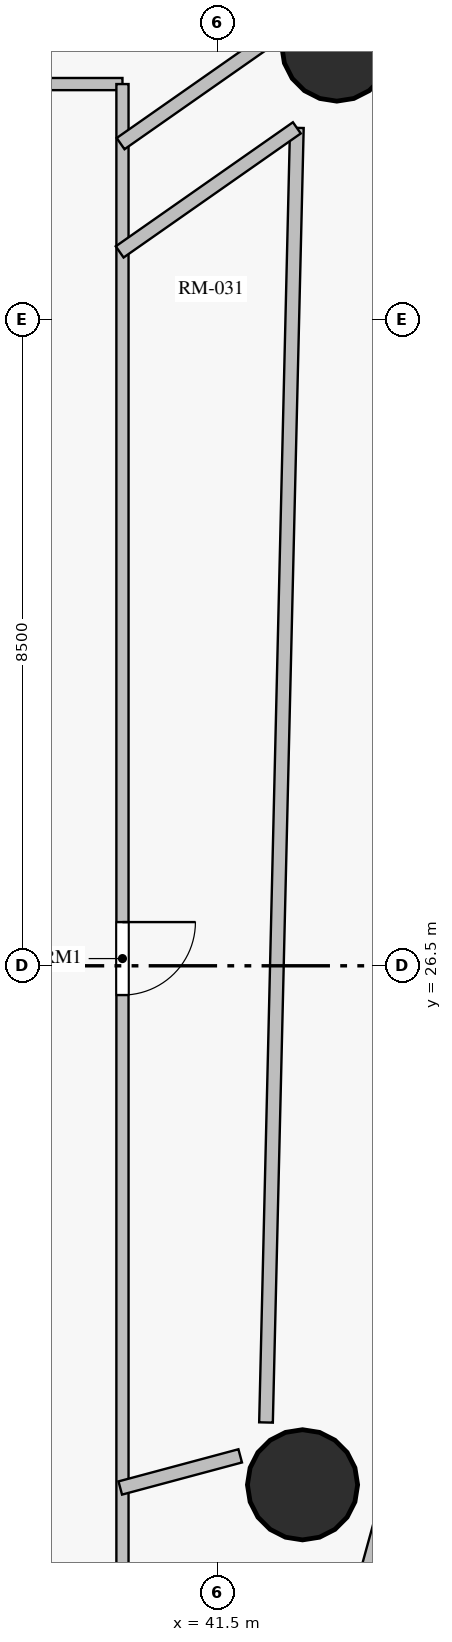
"""IFC4 building model, lengths in metres.
Left out: names, types, materials, properties, quantities, classifications, styles, units other than length and angle.
Written with IfcOpenShell. Run it as: python <this file> out.ifc"""

import sys

from ifc_helpers import new_model, si_unit, direction, frame, frame_2d, origin, origin_with_axes, origin_2d, place, context, subcontext, project, spatial, rectangle, circle, extrude, source, transform, mapped, element, fill, save


model = new_model("IFC4")
c1 = context("Model", 3, precision=1e-05, world=origin(), true_north=direction((0.0, 1.0)))
c2 = subcontext(c1, "Body", "Model", "MODEL_VIEW")
j1 = project(units=[si_unit("LENGTHUNIT", "METRE"), si_unit("PLANEANGLEUNIT", "RADIAN")], contexts=[c1])
p1 = place(None, origin())
s1 = spatial("IfcSite", under=j1, at=p1, CompositionType="ELEMENT")
p2 = place(p1, origin())
s2 = spatial("IfcBuilding", under=s1, at=p2, CompositionType="ELEMENT")
p3 = place(p2, frame((0.0, 0.0, 148.05)))
s3 = spatial("IfcBuildingStorey", under=s2, at=p3, CompositionType="ELEMENT", Elevation=148.05)
m1 = source(origin_with_axes(), c2, "Body", "SweptSolid", [
    extrude(circle(Radius=0.725, at=origin_2d()), origin(), (0.0, 0.0, 1.0), 4.5),
])
for number, where, z_axis, x_axis in (
    (1, (42.619, 19.672, 0.0), (0.0, 0.0, 1.0), (1.0, 0.0, 0.0)),
    (2, (43.07, 38.6, 0.0), (0.0, 0.0, 1.0), (1.0, 0.0, 0.0)),
):
    element("IfcColumn", number, at=place(p3, frame(where, z_axis=z_axis, x_axis=x_axis)), inside=s3, PredefinedType="COLUMN", context=c2, shape_type="MappedRepresentation", body=[
        mapped(m1, transform((0.0, 0.0, 0.0), scale=1.0)),
    ])
p4 = place(p3, frame((43.241, 17.432, 0.0), z_axis=(0.0, 0.0, 1.0), x_axis=(0.264882095781, 0.964280807304, 0.0)))
e3 = element("IfcWall", 3, at=p4, inside=s3, PredefinedType="SOLIDWALL", context=c2, shape_type="SweptSolid", body=[
    extrude(rectangle(XDim=9.679, YDim=0.32, at=frame_2d((4.839, 0.0))), origin(), (0.0, 0.0, 1.0), 4.275),
])
p5 = place(p3, frame((15.8, 38.1, 0.0), z_axis=(0.0, 0.0, 1.0), x_axis=(1.0, 0.0, 0.0)))
e4 = element("IfcWall", 4, at=p5, inside=s3, PredefinedType="PARTITIONING", context=c2, shape_type="SweptSolid", body=[
    extrude(rectangle(XDim=24.45, YDim=0.16, at=frame_2d((12.225, 0.0))), origin(), (0.0, 0.0, 1.0), 3.375),
])
p6 = place(p5, frame((15.417, 0.0, 0.0)))
e5 = element("IfcOpeningElement", 5, at=p6, cuts=e4, PredefinedType="OPENING", context=c2, shape_type="SweptSolid", body=[
    extrude(rectangle(XDim=0.96, YDim=2.15, at=frame_2d((0.48, 1.075))), frame((0.0, 0.09, 0.0), z_axis=(0.0, -1.0, 0.0), x_axis=(1.0, 0.0, 0.0)), (0.0, 0.0, 1.0), 0.18),
])
p7 = place(p5, frame((11.89, 0.0, 0.0)))
e6 = element("IfcOpeningElement", 6, at=p7, cuts=e4, PredefinedType="OPENING", context=c2, shape_type="SweptSolid", body=[
    extrude(rectangle(XDim=0.96, YDim=2.15, at=frame_2d((0.48, 1.075))), frame((0.0, 0.09, 0.0), z_axis=(0.0, -1.0, 0.0), x_axis=(1.0, 0.0, 0.0)), (0.0, 0.0, 1.0), 0.18),
])
p8 = place(p5, frame((7.942, 0.0, 0.0)))
e7 = element("IfcOpeningElement", 7, at=p8, cuts=e4, PredefinedType="OPENING", context=c2, shape_type="SweptSolid", body=[
    extrude(rectangle(XDim=0.96, YDim=2.15, at=frame_2d((0.48, 1.075))), frame((0.0, 0.09, 0.0), z_axis=(0.0, -1.0, 0.0), x_axis=(1.0, 0.0, 0.0)), (0.0, 0.0, 1.0), 0.18),
])
p9 = place(p3, frame((40.25, 38.1, 0.0), z_axis=(0.0, 0.0, 1.0), x_axis=(0.0, -1.0, 0.0)))
e8 = element("IfcWall", 8, at=p9, inside=s3, PredefinedType="PARTITIONING", context=c2, shape_type="SweptSolid", body=[
    extrude(rectangle(XDim=23.0, YDim=0.16, at=frame_2d((11.5, 0.0))), origin(), (0.0, 0.0, 1.0), 3.375),
])
p10 = place(p9, frame((11.025, 0.0, 0.0)))
e9 = element("IfcOpeningElement", 9, at=p10, cuts=e8, PredefinedType="OPENING", context=c2, shape_type="SweptSolid", body=[
    extrude(rectangle(XDim=0.96, YDim=2.15, at=frame_2d((0.48, 1.075))), frame((0.0, 0.09, 0.0), z_axis=(0.0, -1.0, 0.0), x_axis=(1.0, 0.0, 0.0)), (0.0, 0.0, 1.0), 0.18),
])
p11 = place(p3, frame((42.544, 37.524, 0.0), z_axis=(0.0, 0.0, 1.0), x_axis=(-0.02381710021, -0.999716332635, 0.0)))
e10 = element("IfcWall", 10, at=p11, inside=s3, PredefinedType="PARTITIONING", context=c2, shape_type="SweptSolid", body=[
    extrude(rectangle(XDim=17.037, YDim=0.18, at=frame_2d((8.518, 0.0))), origin(), (0.0, 0.0, 1.0), 3.375),
])
p12 = place(p3, frame((40.213, 35.892, 0.0), z_axis=(0.0, 0.0, 1.0), x_axis=(0.819175487294, 0.573542954814, 0.0)))
e11 = element("IfcWall", 11, at=p12, inside=s3, PredefinedType="PARTITIONING", context=c2, shape_type="SweptSolid", body=[
    extrude(rectangle(XDim=2.846, YDim=0.18, at=frame_2d((1.423, 0.0))), origin(), (0.0, 0.0, 1.0), 2.775),
])
p13 = place(p3, frame((42.066, 38.605, 0.0), z_axis=(0.0, 0.0, 1.0), x_axis=(-0.81918087615, -0.573535257983, 0.0)))
e12 = element("IfcWall", 12, at=p13, inside=s3, PredefinedType="PARTITIONING", context=c2, shape_type="SweptSolid", body=[
    extrude(rectangle(XDim=2.247, YDim=0.18, at=frame_2d((1.124, 0.0))), origin(), (0.0, 0.0, 1.0), 2.775),
])
p14 = place(p3, frame((41.799, 20.053, 0.0), z_axis=(0.0, 0.0, 1.0), x_axis=(-0.965926707179, -0.258815757555, 0.0)))
e13 = element("IfcWall", 13, at=p14, inside=s3, PredefinedType="PARTITIONING", context=c2, shape_type="SweptSolid", body=[
    extrude(rectangle(XDim=1.634, YDim=0.18, at=frame_2d((0.817, 0.0))), origin(), (0.0, 0.0, 1.0), 2.775),
])
m2 = source(origin_with_axes(), c2, "Body", "SweptSolid", [
    extrude(rectangle(XDim=0.96, YDim=2.15, at=frame_2d((0.48, 1.075))), frame((0.0, 0.025, 0.0), z_axis=(0.0, -1.0, 0.0), x_axis=(1.0, 0.0, 0.0)), (0.0, 0.0, 1.0), 0.05),
])
p15 = place(p10, origin())
e14 = element("IfcDoor", 14, at=p15, inside=s3, OperationType="SINGLE_SWING_LEFT", PredefinedType="DOOR", context=c2, shape_type="MappedRepresentation", body=[
    mapped(m2, transform((0.0, 0.0, 0.0), scale=1.0)),
])
fill(e9, e14)
save(model, sys.argv[1])
